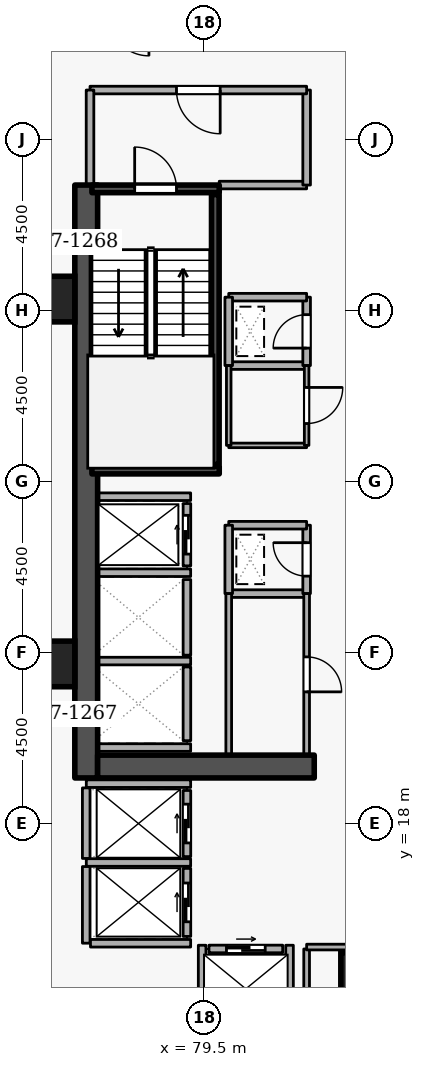
"""IFC4 building model, lengths in metres.
Left out: names, types, materials, properties, quantities, classifications, styles, units other than length and angle.
Written with IfcOpenShell. Run it as: python <this file> out.ifc"""

import sys

from ifc_helpers import new_model, si_unit, direction, frame, frame_2d, origin, origin_2d, place, context, subcontext, project, spatial, rectangle, extrude, element, fill, save


model = new_model("IFC4")
c1 = context("Model", 3, precision=1e-05, world=origin(), true_north=direction((0.0, 1.0)))
c2 = subcontext(c1, "Body", "Model", "MODEL_VIEW")
j1 = project(units=[si_unit("LENGTHUNIT", "METRE"), si_unit("PLANEANGLEUNIT", "RADIAN")], contexts=[c1])
p1 = place(None, origin())
s1 = spatial("IfcSite", under=j1, at=p1, CompositionType="ELEMENT")
p2 = place(p1, origin())
s2 = spatial("IfcBuilding", under=s1, at=p2, CompositionType="ELEMENT")
p3 = place(p2, frame((0.0, 0.0, 105.3)))
s3 = spatial("IfcBuildingStorey", under=s2, at=p3, CompositionType="ELEMENT", Elevation=105.3)
p4 = place(p3, frame((76.4, 19.2, 0.0), z_axis=(0.0, 0.0, 1.0), x_axis=(0.0, 1.0, 0.0)))
e1 = element("IfcWall", 1, at=p4, inside=s3, PredefinedType="SHEAR", context=c2, shape_type="SweptSolid", body=[
    extrude(rectangle(XDim=15.6, YDim=0.6, at=frame_2d((7.8, 0.0))), origin(), (0.0, 0.0, 1.0), 3.6),
])
p5 = place(p3, frame((76.7, 19.5, 0.0), z_axis=(0.0, 0.0, 1.0), x_axis=(1.0, 0.0, 0.0)))
e2 = element("IfcWall", 2, at=p5, inside=s3, PredefinedType="SHEAR", context=c2, shape_type="SweptSolid", body=[
    extrude(rectangle(XDim=5.7, YDim=0.6, at=frame_2d((2.85, 0.0))), origin(), (0.0, 0.0, 1.0), 3.6),
])
for number, where, z_axis, x_axis in (
    (3, (83.7, 14.0, 0.0), (0.0, 0.0, 1.0), (1.0, 0.0, 0.0)),
    (4, (75.5, 22.2, 0.0), (0.0, 0.0, 1.0), (1.0, 0.0, 0.0)),
    (5, (75.5, 31.8, 0.0), (0.0, 0.0, 1.0), (1.0, 0.0, 0.0)),
):
    element("IfcColumn", number, at=place(p3, frame(where, z_axis=z_axis, x_axis=x_axis)), inside=s3, PredefinedType="COLUMN", context=c2, shape_type="SweptSolid", body=[
        extrude(rectangle(XDim=1.2, YDim=1.2, at=origin_2d()), origin(), (0.0, 0.0, 1.0), 3.6),
    ])
p6 = place(p3, frame((79.05, 24.78, 0.0), z_axis=(0.0, 0.0, 1.0), x_axis=(0.0, 1.0, 0.0)))
e6 = element("IfcWall", 6, at=p6, inside=s3, PredefinedType="STANDARD", context=c2, shape_type="SweptSolid", body=[
    extrude(rectangle(XDim=1.64, YDim=0.2, at=frame_2d((0.82, 0.0))), origin(), (0.0, 0.0, 1.0), 3.34),
])
p7 = place(p6, frame((0.31, 0.0, 0.0)))
e7 = element("IfcOpeningElement", 7, at=p7, cuts=e6, PredefinedType="OPENING", context=c2, shape_type="SweptSolid", body=[
    extrude(rectangle(XDim=1.02, YDim=2.06, at=frame_2d((0.51, 1.03))), frame((0.0, 0.11, 0.0), z_axis=(0.0, -1.0, 0.0), x_axis=(1.0, 0.0, 0.0)), (0.0, 0.0, 1.0), 0.22),
])
p8 = place(p3, frame((79.05, 22.43, 0.0), z_axis=(0.0, 0.0, 1.0), x_axis=(0.0, 1.0, 0.0)))
e8 = element("IfcWall", 8, at=p8, inside=s3, PredefinedType="STANDARD", context=c2, shape_type="SweptSolid", body=[
    extrude(rectangle(XDim=1.99, YDim=0.2, at=frame_2d((0.995, 0.0))), origin(), (0.0, 0.0, 1.0), 3.34),
])
p9 = place(p3, frame((79.05, 20.18, 0.0), z_axis=(0.0, 0.0, 1.0), x_axis=(0.0, 1.0, 0.0)))
e9 = element("IfcWall", 9, at=p9, inside=s3, PredefinedType="STANDARD", context=c2, shape_type="SweptSolid", body=[
    extrude(rectangle(XDim=1.94, YDim=0.2, at=frame_2d((0.97, 0.0))), origin(), (0.0, 0.0, 1.0), 3.34),
])
p10 = place(p3, frame((79.05, 17.13, 0.0), z_axis=(0.0, 0.0, 1.0), x_axis=(0.0, 1.0, 0.0)))
e10 = element("IfcWall", 10, at=p10, inside=s3, PredefinedType="STANDARD", context=c2, shape_type="SweptSolid", body=[
    extrude(rectangle(XDim=1.74, YDim=0.2, at=frame_2d((0.87, 0.0))), origin(), (0.0, 0.0, 1.0), 3.34),
])
p11 = place(p10, frame((0.36, 0.0, 0.0)))
e11 = element("IfcOpeningElement", 11, at=p11, cuts=e10, PredefinedType="OPENING", context=c2, shape_type="SweptSolid", body=[
    extrude(rectangle(XDim=1.02, YDim=2.06, at=frame_2d((0.51, 1.03))), frame((0.0, 0.11, 0.0), z_axis=(0.0, -1.0, 0.0), x_axis=(1.0, 0.0, 0.0)), (0.0, 0.0, 1.0), 0.22),
])
p12 = place(p3, frame((79.05, 15.03, 0.0), z_axis=(0.0, 0.0, 1.0), x_axis=(0.0, 1.0, 0.0)))
e12 = element("IfcWall", 12, at=p12, inside=s3, PredefinedType="STANDARD", context=c2, shape_type="SweptSolid", body=[
    extrude(rectangle(XDim=1.79, YDim=0.2, at=frame_2d((0.895, 0.0))), origin(), (0.0, 0.0, 1.0), 3.34),
])
p13 = place(p12, frame((0.385, 0.0, 0.0)))
e13 = element("IfcOpeningElement", 13, at=p13, cuts=e12, PredefinedType="OPENING", context=c2, shape_type="SweptSolid", body=[
    extrude(rectangle(XDim=1.02, YDim=2.06, at=frame_2d((0.51, 1.03))), frame((0.0, 0.11, 0.0), z_axis=(0.0, -1.0, 0.0), x_axis=(1.0, 0.0, 0.0)), (0.0, 0.0, 1.0), 0.22),
])
p14 = place(p3, frame((79.63, 14.7, 0.0), z_axis=(0.0, 0.0, 1.0), x_axis=(1.0, 0.0, 0.0)))
e14 = element("IfcWall", 14, at=p14, inside=s3, PredefinedType="STANDARD", context=c2, shape_type="SweptSolid", body=[
    extrude(rectangle(XDim=1.94, YDim=0.2, at=frame_2d((0.97, 0.0))), origin(), (0.0, 0.0, 1.0), 3.34),
])
p15 = place(p14, frame((0.46, 0.0, 0.0)))
e15 = element("IfcOpeningElement", 15, at=p15, cuts=e14, PredefinedType="OPENING", context=c2, shape_type="SweptSolid", body=[
    extrude(rectangle(XDim=1.02, YDim=2.06, at=frame_2d((0.51, 1.03))), frame((0.0, 0.11, 0.0), z_axis=(0.0, -1.0, 0.0), x_axis=(1.0, 0.0, 0.0)), (0.0, 0.0, 1.0), 0.22),
])
for number, where, z_axis, x_axis in (
    (16, (76.712, 26.6, 0.0), (0.0, 0.0, 1.0), (1.0, 0.0, 0.0)),
    (17, (76.712, 24.6, 0.0), (0.0, 0.0, 1.0), (1.0, 0.0, 0.0)),
    (18, (76.712, 22.275, 0.0), (0.0, 0.0, 1.0), (1.0, 0.0, 0.0)),
    (19, (76.712, 20.0, 0.0), (0.0, 0.0, 1.0), (1.0, 0.0, 0.0)),
):
    element("IfcWall", number, at=place(p3, frame(where, z_axis=z_axis, x_axis=x_axis)), inside=s3, PredefinedType="STANDARD", context=c2, shape_type="SweptSolid", body=[
        extrude(rectangle(XDim=2.436, YDim=0.2, at=frame_2d((1.218, 0.0))), origin(), (0.0, 0.0, 1.0), 3.34),
    ])
p16 = place(p3, frame((76.402, 19.05, 0.0), z_axis=(0.0, 0.0, 1.0), x_axis=(1.0, 0.0, 0.0)))
e20 = element("IfcWall", 20, at=p16, inside=s3, PredefinedType="STANDARD", context=c2, shape_type="SweptSolid", body=[
    extrude(rectangle(XDim=2.746, YDim=0.2, at=frame_2d((1.373, 0.0))), origin(), (0.0, 0.0, 1.0), 2.545),
])
p17 = place(p3, frame((76.402, 16.975, 0.0), z_axis=(0.0, 0.0, 1.0), x_axis=(1.0, 0.0, 0.0)))
e21 = element("IfcWall", 21, at=p17, inside=s3, PredefinedType="STANDARD", context=c2, shape_type="SweptSolid", body=[
    extrude(rectangle(XDim=2.746, YDim=0.2, at=frame_2d((1.373, 0.0))), origin(), (0.0, 0.0, 1.0), 3.34),
])
p18 = place(p3, frame((76.4, 14.852, 0.0), z_axis=(0.0, 0.0, 1.0), x_axis=(0.0, 1.0, 0.0)))
e22 = element("IfcWall", 22, at=p18, inside=s3, PredefinedType="STANDARD", context=c2, shape_type="SweptSolid", body=[
    extrude(rectangle(XDim=2.016, YDim=0.2, at=frame_2d((1.008, 0.0))), origin(), (0.0, 0.0, 1.0), 3.34),
])
p19 = place(p3, frame((76.4, 17.082, 0.0), z_axis=(0.0, 0.0, 1.0), x_axis=(0.0, 1.0, 0.0)))
e23 = element("IfcWall", 23, at=p19, inside=s3, PredefinedType="STANDARD", context=c2, shape_type="SweptSolid", body=[
    extrude(rectangle(XDim=1.856, YDim=0.2, at=frame_2d((0.928, 0.0))), origin(), (0.0, 0.0, 1.0), 3.34),
])
p20 = place(p3, frame((76.512, 14.85, 0.0), z_axis=(0.0, 0.0, 1.0), x_axis=(1.0, 0.0, 0.0)))
e24 = element("IfcWall", 24, at=p20, inside=s3, PredefinedType="STANDARD", context=c2, shape_type="SweptSolid", body=[
    extrude(rectangle(XDim=2.636, YDim=0.2, at=frame_2d((1.318, 0.0))), origin(), (0.0, 0.0, 1.0), 3.34),
])
for number, where, z_axis, x_axis in (
    (25, (81.75, 12.612, 0.0), (0.0, 0.0, 1.0), (0.0, 1.0, 0.0)),
    (26, (79.45, 12.612, 0.0), (0.0, 0.0, 1.0), (0.0, 1.0, 0.0)),
):
    element("IfcWall", number, at=place(p3, frame(where, z_axis=z_axis, x_axis=x_axis)), inside=s3, PredefinedType="STANDARD", context=c2, shape_type="SweptSolid", body=[
        extrude(rectangle(XDim=2.186, YDim=0.2, at=frame_2d((1.093, 0.0))), origin(), (0.0, 0.0, 1.0), 3.34),
    ])
p21 = place(p3, frame((76.55, 34.7, 0.0), z_axis=(0.0, 0.0, 1.0), x_axis=(1.0, 0.0, 0.0)))
e27 = element("IfcWall", 27, at=p21, inside=s3, PredefinedType="SHEAR", context=c2, shape_type="SweptSolid", body=[
    extrude(rectangle(XDim=3.35, YDim=0.2, at=frame_2d((1.675, 0.0))), origin(), (0.0, 0.0, 1.0), 3.6),
])
p22 = place(p21, frame((1.125, 0.0, 0.0)))
e28 = element("IfcOpeningElement", 28, at=p22, cuts=e27, PredefinedType="OPENING", context=c2, shape_type="SweptSolid", body=[
    extrude(rectangle(XDim=1.1, YDim=2.1, at=frame_2d((0.55, 1.05))), frame((0.0, 0.11, 0.0), z_axis=(0.0, -1.0, 0.0), x_axis=(1.0, 0.0, 0.0)), (0.0, 0.0, 1.0), 0.22),
])
p23 = place(p3, frame((79.9, 27.3, 0.0), z_axis=(0.0, 0.0, 1.0), x_axis=(-1.0, 0.0, 0.0)))
e29 = element("IfcWall", 29, at=p23, inside=s3, PredefinedType="SHEAR", context=c2, shape_type="SweptSolid", body=[
    extrude(rectangle(XDim=3.35, YDim=0.2, at=frame_2d((1.675, 0.0))), origin(), (0.0, 0.0, 1.0), 3.6),
])
p24 = place(p3, frame((79.797, 27.45, 0.0), z_axis=(0.0, 0.0, 1.0), x_axis=(0.0, 1.0, 0.0)))
e30 = element("IfcWall", 30, at=p24, inside=s3, PredefinedType="SHEAR", context=c2, shape_type="SweptSolid", body=[
    extrude(rectangle(XDim=7.1, YDim=0.2, at=frame_2d((3.55, 0.0))), origin(), (0.0, 0.0, 1.0), 3.6),
])
p25 = place(p3, frame((79.9, 34.8, 0.0), z_axis=(0.0, 0.0, 1.0), x_axis=(1.0, 0.0, 0.0)))
e31 = element("IfcWall", 31, at=p25, inside=s3, PredefinedType="STANDARD", context=c2, shape_type="SweptSolid", body=[
    extrude(rectangle(XDim=2.3, YDim=0.2, at=frame_2d((1.15, 0.0))), origin(), (0.0, 0.0, 1.0), 2.545),
])
p26 = place(p3, frame((82.2, 34.8, 0.0), z_axis=(0.0, 0.0, 1.0), x_axis=(0.0, 1.0, 0.0)))
e32 = element("IfcWall", 32, at=p26, inside=s3, PredefinedType="STANDARD", context=c2, shape_type="SweptSolid", body=[
    extrude(rectangle(XDim=2.5, YDim=0.2, at=frame_2d((1.25, 0.0))), origin(), (0.0, 0.0, 1.0), 3.34),
])
p27 = place(p3, frame((82.2, 37.3, 0.0), z_axis=(0.0, 0.0, 1.0), x_axis=(-1.0, 0.0, 0.0)))
e33 = element("IfcWall", 33, at=p27, inside=s3, PredefinedType="STANDARD", context=c2, shape_type="SweptSolid", body=[
    extrude(rectangle(XDim=5.7, YDim=0.2, at=frame_2d((2.85, 0.0))), origin(), (0.0, 0.0, 1.0), 3.34),
])
p28 = place(p27, frame((2.275, 0.0, 0.0)))
e34 = element("IfcOpeningElement", 34, at=p28, cuts=e33, PredefinedType="OPENING", context=c2, shape_type="SweptSolid", body=[
    extrude(rectangle(XDim=1.15, YDim=2.1, at=frame_2d((0.575, 1.05))), frame((0.0, 0.11, 0.0), z_axis=(0.0, -1.0, 0.0), x_axis=(1.0, 0.0, 0.0)), (0.0, 0.0, 1.0), 0.22),
])
p29 = place(p3, frame((76.5, 37.3, 0.0), z_axis=(0.0, 0.0, 1.0), x_axis=(0.0, -1.0, 0.0)))
e35 = element("IfcWall", 35, at=p29, inside=s3, PredefinedType="STANDARD", context=c2, shape_type="SweptSolid", body=[
    extrude(rectangle(XDim=2.5, YDim=0.2, at=frame_2d((1.25, 0.0))), origin(), (0.0, 0.0, 1.0), 3.34),
])
p30 = place(p3, frame((80.15, 24.05, 0.0), z_axis=(0.0, 0.0, 1.0), x_axis=(1.0, 0.0, 0.0)))
e36 = element("IfcWall", 36, at=p30, inside=s3, PredefinedType="STANDARD", context=c2, shape_type="SweptSolid", body=[
    extrude(rectangle(XDim=2.05, YDim=0.2, at=frame_2d((1.025, 0.0))), origin(), (0.0, 0.0, 1.0), 3.34),
])
p31 = place(p3, frame((82.2, 24.05, 0.0), z_axis=(0.0, 0.0, 1.0), x_axis=(0.0, 1.0, 0.0)))
e37 = element("IfcWall", 37, at=p31, inside=s3, PredefinedType="STANDARD", context=c2, shape_type="SweptSolid", body=[
    extrude(rectangle(XDim=1.8, YDim=0.2, at=frame_2d((0.9, 0.0))), origin(), (0.0, 0.0, 1.0), 3.34),
])
p32 = place(p31, frame((0.46, 0.0, 0.0)))
e38 = element("IfcOpeningElement", 38, at=p32, cuts=e37, PredefinedType="OPENING", context=c2, shape_type="SweptSolid", body=[
    extrude(rectangle(XDim=0.88, YDim=2.04, at=frame_2d((0.44, 1.02))), frame((0.0, 0.11, 0.0), z_axis=(0.0, -1.0, 0.0), x_axis=(1.0, 0.0, 0.0)), (0.0, 0.0, 1.0), 0.22),
])
p33 = place(p3, frame((82.2, 25.85, 0.0), z_axis=(0.0, 0.0, 1.0), x_axis=(-1.0, 0.0, 0.0)))
e39 = element("IfcWall", 39, at=p33, inside=s3, PredefinedType="STANDARD", context=c2, shape_type="SweptSolid", body=[
    extrude(rectangle(XDim=2.05, YDim=0.2, at=frame_2d((1.025, 0.0))), origin(), (0.0, 0.0, 1.0), 3.34),
])
p34 = place(p3, frame((80.15, 25.85, 0.0), z_axis=(0.0, 0.0, 1.0), x_axis=(0.0, -1.0, 0.0)))
e40 = element("IfcWall", 40, at=p34, inside=s3, PredefinedType="STANDARD", context=c2, shape_type="SweptSolid", body=[
    extrude(rectangle(XDim=1.8, YDim=0.2, at=frame_2d((0.9, 0.0))), origin(), (0.0, 0.0, 1.0), 3.34),
])
p35 = place(p3, frame((80.15, 30.05, 0.0), z_axis=(0.0, 0.0, 1.0), x_axis=(1.0, 0.0, 0.0)))
e41 = element("IfcWall", 41, at=p35, inside=s3, PredefinedType="STANDARD", context=c2, shape_type="SweptSolid", body=[
    extrude(rectangle(XDim=2.05, YDim=0.2, at=frame_2d((1.025, 0.0))), origin(), (0.0, 0.0, 1.0), 3.34),
])
p36 = place(p3, frame((82.2, 30.05, 0.0), z_axis=(0.0, 0.0, 1.0), x_axis=(0.0, 1.0, 0.0)))
e42 = element("IfcWall", 42, at=p36, inside=s3, PredefinedType="STANDARD", context=c2, shape_type="SweptSolid", body=[
    extrude(rectangle(XDim=1.8, YDim=0.2, at=frame_2d((0.9, 0.0))), origin(), (0.0, 0.0, 1.0), 3.34),
])
p37 = place(p36, frame((0.46, 0.0, 0.0)))
e43 = element("IfcOpeningElement", 43, at=p37, cuts=e42, PredefinedType="OPENING", context=c2, shape_type="SweptSolid", body=[
    extrude(rectangle(XDim=0.88, YDim=2.04, at=frame_2d((0.44, 1.02))), frame((0.0, 0.11, 0.0), z_axis=(0.0, -1.0, 0.0), x_axis=(1.0, 0.0, 0.0)), (0.0, 0.0, 1.0), 0.22),
])
p38 = place(p3, frame((82.2, 31.85, 0.0), z_axis=(0.0, 0.0, 1.0), x_axis=(-1.0, 0.0, 0.0)))
e44 = element("IfcWall", 44, at=p38, inside=s3, PredefinedType="STANDARD", context=c2, shape_type="SweptSolid", body=[
    extrude(rectangle(XDim=2.05, YDim=0.2, at=frame_2d((1.025, 0.0))), origin(), (0.0, 0.0, 1.0), 3.34),
])
p39 = place(p3, frame((80.15, 31.85, 0.0), z_axis=(0.0, 0.0, 1.0), x_axis=(0.0, -1.0, 0.0)))
e45 = element("IfcWall", 45, at=p39, inside=s3, PredefinedType="STANDARD", context=c2, shape_type="SweptSolid", body=[
    extrude(rectangle(XDim=1.8, YDim=0.2, at=frame_2d((0.9, 0.0))), origin(), (0.0, 0.0, 1.0), 3.34),
])
p40 = place(p3, frame((80.15, 19.8, 0.0), z_axis=(0.0, 0.0, 1.0), x_axis=(0.0, 1.0, 0.0)))
e46 = element("IfcWall", 46, at=p40, inside=s3, PredefinedType="PARTITIONING", context=c2, shape_type="SweptSolid", body=[
    extrude(rectangle(XDim=4.25, YDim=0.15, at=frame_2d((2.125, 0.0))), origin(), (0.0, 0.0, 1.0), 3.34),
])
p41 = place(p3, frame((82.2, 24.05, 0.0), z_axis=(0.0, 0.0, 1.0), x_axis=(0.0, -1.0, 0.0)))
e47 = element("IfcWall", 47, at=p41, inside=s3, PredefinedType="PARTITIONING", context=c2, shape_type="SweptSolid", body=[
    extrude(rectangle(XDim=4.25, YDim=0.15, at=frame_2d((2.125, 0.0))), origin(), (0.0, 0.0, 1.0), 3.34),
])
p42 = place(p41, frame((1.665, 0.0, 0.0)))
e48 = element("IfcOpeningElement", 48, at=p42, cuts=e47, PredefinedType="OPENING", context=c2, shape_type="SweptSolid", body=[
    extrude(rectangle(XDim=0.92, YDim=2.08, at=frame_2d((0.46, 1.04))), frame((0.0, 0.085, 0.0), z_axis=(0.0, -1.0, 0.0), x_axis=(1.0, 0.0, 0.0)), (0.0, 0.0, 1.0), 0.17),
])
p43 = place(p3, frame((82.2, 27.95, 0.0), z_axis=(0.0, 0.0, 1.0), x_axis=(-1.0, 0.0, 0.0)))
e49 = element("IfcWall", 49, at=p43, inside=s3, PredefinedType="PARTITIONING", context=c2, shape_type="SweptSolid", body=[
    extrude(rectangle(XDim=2.05, YDim=0.12, at=frame_2d((1.025, 0.0))), origin(), (0.0, 0.0, 1.0), 3.34),
])
p44 = place(p3, frame((80.15, 27.95, 0.0), z_axis=(0.0, 0.0, 1.0), x_axis=(0.0, 1.0, 0.0)))
e50 = element("IfcWall", 50, at=p44, inside=s3, PredefinedType="PARTITIONING", context=c2, shape_type="SweptSolid", body=[
    extrude(rectangle(XDim=2.1, YDim=0.12, at=frame_2d((1.05, 0.0))), origin(), (0.0, 0.0, 1.0), 3.34),
])
p45 = place(p3, frame((82.2, 30.05, 0.0), z_axis=(0.0, 0.0, 1.0), x_axis=(0.0, -1.0, 0.0)))
e51 = element("IfcWall", 51, at=p45, inside=s3, PredefinedType="PARTITIONING", context=c2, shape_type="SweptSolid", body=[
    extrude(rectangle(XDim=2.1, YDim=0.12, at=frame_2d((1.05, 0.0))), origin(), (0.0, 0.0, 1.0), 3.34),
])
p46 = place(p45, frame((0.575, 0.0, 0.0)))
e52 = element("IfcOpeningElement", 52, at=p46, cuts=e51, PredefinedType="OPENING", context=c2, shape_type="SweptSolid", body=[
    extrude(rectangle(XDim=0.95, YDim=2.1, at=frame_2d((0.475, 1.05))), frame((0.0, 0.07, 0.0), z_axis=(0.0, -1.0, 0.0), x_axis=(1.0, 0.0, 0.0)), (0.0, 0.0, 1.0), 0.14),
])
p47 = place(p3, frame((82.2, 12.4, 0.0), z_axis=(0.0, 0.0, 1.0), x_axis=(0.0, 1.0, 0.0)))
e53 = element("IfcWall", 53, at=p47, inside=s3, PredefinedType="PARTITIONING", context=c2, shape_type="SweptSolid", body=[
    extrude(rectangle(XDim=2.3, YDim=0.15, at=frame_2d((1.15, 0.0))), origin(), (0.0, 0.0, 1.0), 3.34),
])
p48 = place(p3, frame((82.2, 14.75, 0.0), z_axis=(0.0, 0.0, 1.0), x_axis=(1.0, 0.0, 0.0)))
e54 = element("IfcWall", 54, at=p48, inside=s3, PredefinedType="PARTITIONING", context=c2, shape_type="SweptSolid", body=[
    extrude(rectangle(XDim=1.85, YDim=0.15, at=frame_2d((0.925, 0.0))), origin(), (0.0, 0.0, 1.0), 3.34),
])
p49 = place(p7, origin())
e55 = element("IfcDoor", 55, at=p49, inside=s3, OperationType="SLIDING_TO_LEFT", PredefinedType="DOOR", context=c2, shape_type="SweptSolid", body=[
    extrude(rectangle(XDim=1.02, YDim=2.06, at=frame_2d((0.51, 1.03))), frame((0.0, 0.025, 0.0), z_axis=(0.0, -1.0, 0.0), x_axis=(1.0, 0.0, 0.0)), (0.0, 0.0, 1.0), 0.05),
])
fill(e7, e55)
p50 = place(p11, origin())
e56 = element("IfcDoor", 56, at=p50, inside=s3, OperationType="SLIDING_TO_LEFT", PredefinedType="DOOR", context=c2, shape_type="SweptSolid", body=[
    extrude(rectangle(XDim=1.02, YDim=2.06, at=frame_2d((0.51, 1.03))), frame((0.0, 0.025, 0.0), z_axis=(0.0, -1.0, 0.0), x_axis=(1.0, 0.0, 0.0)), (0.0, 0.0, 1.0), 0.05),
])
fill(e11, e56)
p51 = place(p13, origin())
e57 = element("IfcDoor", 57, at=p51, inside=s3, OperationType="SLIDING_TO_LEFT", PredefinedType="DOOR", context=c2, shape_type="SweptSolid", body=[
    extrude(rectangle(XDim=1.02, YDim=2.06, at=frame_2d((0.51, 1.03))), frame((0.0, 0.025, 0.0), z_axis=(0.0, -1.0, 0.0), x_axis=(1.0, 0.0, 0.0)), (0.0, 0.0, 1.0), 0.05),
])
fill(e13, e57)
p52 = place(p15, origin())
e58 = element("IfcDoor", 58, at=p52, inside=s3, OperationType="SLIDING_TO_LEFT", PredefinedType="DOOR", context=c2, shape_type="SweptSolid", body=[
    extrude(rectangle(XDim=1.02, YDim=2.06, at=frame_2d((0.51, 1.03))), frame((0.0, 0.025, 0.0), z_axis=(0.0, -1.0, 0.0), x_axis=(1.0, 0.0, 0.0)), (0.0, 0.0, 1.0), 0.05),
])
fill(e15, e58)
p53 = place(p22, origin())
e59 = element("IfcDoor", 59, at=p53, inside=s3, OperationType="SINGLE_SWING_LEFT", PredefinedType="DOOR", context=c2, shape_type="SweptSolid", body=[
    extrude(rectangle(XDim=1.1, YDim=2.1, at=frame_2d((0.55, 1.05))), frame((0.0, 0.025, 0.0), z_axis=(0.0, -1.0, 0.0), x_axis=(1.0, 0.0, 0.0)), (0.0, 0.0, 1.0), 0.05),
])
fill(e28, e59)
p54 = place(p28, origin())
e60 = element("IfcDoor", 60, at=p54, inside=s3, OperationType="SINGLE_SWING_LEFT", PredefinedType="DOOR", context=c2, shape_type="SweptSolid", body=[
    extrude(rectangle(XDim=1.15, YDim=2.1, at=frame_2d((0.575, 1.05))), frame((0.0, 0.025, 0.0), z_axis=(0.0, -1.0, 0.0), x_axis=(1.0, 0.0, 0.0)), (0.0, 0.0, 1.0), 0.05),
])
fill(e34, e60)
p55 = place(p32, origin())
e61 = element("IfcDoor", 61, at=p55, inside=s3, OperationType="SINGLE_SWING_RIGHT", PredefinedType="DOOR", context=c2, shape_type="SweptSolid", body=[
    extrude(rectangle(XDim=0.88, YDim=2.04, at=frame_2d((0.44, 1.02))), frame((0.0, 0.025, 0.0), z_axis=(0.0, -1.0, 0.0), x_axis=(1.0, 0.0, 0.0)), (0.0, 0.0, 1.0), 0.05),
])
fill(e38, e61)
p56 = place(p37, origin())
e62 = element("IfcDoor", 62, at=p56, inside=s3, OperationType="SINGLE_SWING_LEFT", PredefinedType="DOOR", context=c2, shape_type="SweptSolid", body=[
    extrude(rectangle(XDim=0.88, YDim=2.04, at=frame_2d((0.44, 1.02))), frame((0.0, 0.025, 0.0), z_axis=(0.0, -1.0, 0.0), x_axis=(1.0, 0.0, 0.0)), (0.0, 0.0, 1.0), 0.05),
])
fill(e43, e62)
p57 = place(p42, origin())
e63 = element("IfcDoor", 63, at=p57, inside=s3, OperationType="SINGLE_SWING_RIGHT", PredefinedType="DOOR", context=c2, shape_type="SweptSolid", body=[
    extrude(rectangle(XDim=0.92, YDim=2.08, at=frame_2d((0.46, 1.04))), frame((0.0, 0.025, 0.0), z_axis=(0.0, -1.0, 0.0), x_axis=(1.0, 0.0, 0.0)), (0.0, 0.0, 1.0), 0.05),
])
fill(e48, e63)
p58 = place(p46, origin())
e64 = element("IfcDoor", 64, at=p58, inside=s3, OperationType="SINGLE_SWING_LEFT", PredefinedType="DOOR", context=c2, shape_type="SweptSolid", body=[
    extrude(rectangle(XDim=0.95, YDim=2.1, at=frame_2d((0.475, 1.05))), frame((0.0, 0.025, 0.0), z_axis=(0.0, -1.0, 0.0), x_axis=(1.0, 0.0, 0.0)), (0.0, 0.0, 1.0), 0.05),
])
fill(e52, e64)
save(model, sys.argv[1])
